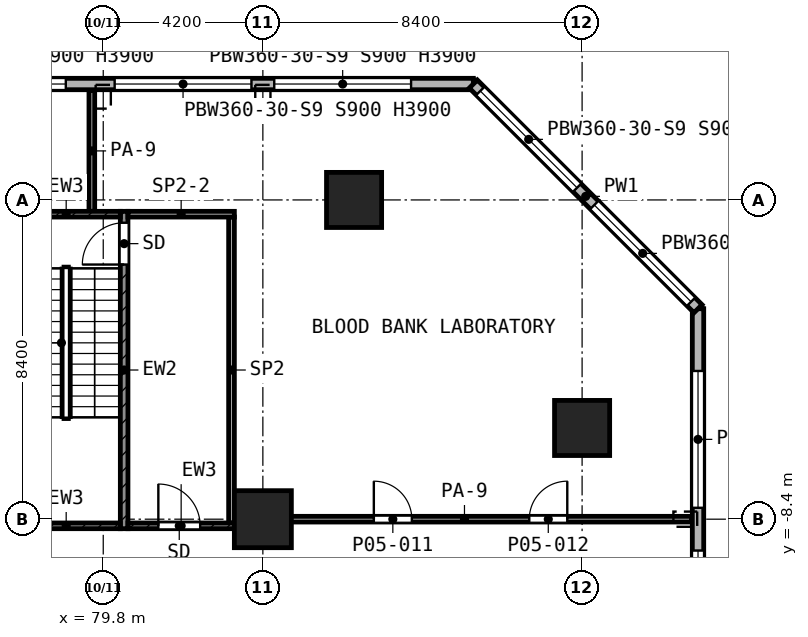
"""IFC4 building model, lengths in metres.
Left out: names, types, materials, properties, quantities, classifications, styles, units other than length and angle.
Written with IfcOpenShell. Run it as: python <this file> out.ifc"""

import sys

from ifc_helpers import new_model, si_unit, direction, frame, frame_2d, origin, origin_2d, place, context, subcontext, project, spatial, rectangle, extrude, element, fill, save


model = new_model("IFC4")
c1 = context("Model", 3, precision=1e-05, world=origin(), true_north=direction((0.0, 1.0)))
c2 = subcontext(c1, "Body", "Model", "MODEL_VIEW")
j1 = project(units=[si_unit("LENGTHUNIT", "METRE"), si_unit("PLANEANGLEUNIT", "RADIAN")], contexts=[c1])
p1 = place(None, origin())
s1 = spatial("IfcSite", under=j1, at=p1, CompositionType="ELEMENT")
p2 = place(p1, origin())
s2 = spatial("IfcBuilding", under=s1, at=p2, CompositionType="ELEMENT")
p3 = place(p2, frame((0.0, 0.0, 23.8)))
s3 = spatial("IfcBuildingStorey", under=s2, at=p3, CompositionType="ELEMENT", Elevation=23.8)
for number, where, z_axis, x_axis in (
    (1, (86.4, 0.0, 0.0), (0.0, 0.0, 1.0), (1.0, 0.0, 0.0)),
    (2, (92.4, -6.0, 0.0), (0.0, 0.0, 1.0), (1.0, 0.0, 0.0)),
):
    element("IfcColumn", number, at=place(p3, frame(where, z_axis=z_axis, x_axis=x_axis)), inside=s3, PredefinedType="COLUMN", context=c2, shape_type="SweptSolid", body=[
        extrude(rectangle(XDim=1.45, YDim=1.45, at=origin_2d()), origin(), (0.0, 0.0, 1.0), 5.2),
    ])
p4 = place(p3, frame((84.0, -8.4, 0.0), z_axis=(0.0, 0.0, 1.0), x_axis=(1.0, 0.0, 0.0)))
e3 = element("IfcColumn", 3, at=p4, inside=s3, PredefinedType="COLUMN", context=c2, shape_type="SweptSolid", body=[
    extrude(rectangle(XDim=1.5, YDim=1.5, at=origin_2d()), origin(), (0.0, 0.0, 1.0), 5.2),
])
p5 = place(p3, frame((95.45, -30.738, 0.0), z_axis=(0.0, 0.0, 1.0), x_axis=(0.0, 1.0, 0.0)))
e4 = element("IfcWall", 4, at=p5, inside=s3, PredefinedType="SOLIDWALL", context=c2, shape_type="SweptSolid", body=[
    extrude(rectangle(XDim=27.876, YDim=0.3, at=frame_2d((13.938, 0.0))), origin(), (0.0, 0.0, 1.0), 4.85),
])
p6 = place(p5, frame((1.638, 0.0, 0.9)))
e5 = element("IfcOpeningElement", 5, at=p6, cuts=e4, PredefinedType="OPENING", context=c2, shape_type="SweptSolid", body=[
    extrude(rectangle(XDim=3.6, YDim=3.0, at=frame_2d((1.8, 1.5))), frame((0.0, 0.16, 0.0), z_axis=(0.0, -1.0, 0.0), x_axis=(1.0, 0.0, 0.0)), (0.0, 0.0, 1.0), 0.32),
])
p7 = place(p5, frame((6.363, 0.0, 0.9)))
e6 = element("IfcOpeningElement", 6, at=p7, cuts=e4, PredefinedType="OPENING", context=c2, shape_type="SweptSolid", body=[
    extrude(rectangle(XDim=1.2, YDim=3.0, at=frame_2d((0.6, 1.5))), frame((0.0, 0.16, 0.0), z_axis=(0.0, -1.0, 0.0), x_axis=(1.0, 0.0, 0.0)), (0.0, 0.0, 1.0), 0.32),
])
p8 = place(p5, frame((10.038, 0.0, 0.9)))
e7 = element("IfcOpeningElement", 7, at=p8, cuts=e4, PredefinedType="OPENING", context=c2, shape_type="SweptSolid", body=[
    extrude(rectangle(XDim=3.6, YDim=3.0, at=frame_2d((1.8, 1.5))), frame((0.0, 0.16, 0.0), z_axis=(0.0, -1.0, 0.0), x_axis=(1.0, 0.0, 0.0)), (0.0, 0.0, 1.0), 0.32),
])
p9 = place(p5, frame((14.238, 0.0, 0.9)))
e8 = element("IfcOpeningElement", 8, at=p9, cuts=e4, PredefinedType="OPENING", context=c2, shape_type="SweptSolid", body=[
    extrude(rectangle(XDim=3.6, YDim=3.0, at=frame_2d((1.8, 1.5))), frame((0.0, 0.16, 0.0), z_axis=(0.0, -1.0, 0.0), x_axis=(1.0, 0.0, 0.0)), (0.0, 0.0, 1.0), 0.32),
])
p10 = place(p5, frame((20.313, 0.0, 0.9)))
e9 = element("IfcOpeningElement", 9, at=p10, cuts=e4, PredefinedType="OPENING", context=c2, shape_type="SweptSolid", body=[
    extrude(rectangle(XDim=1.2, YDim=3.0, at=frame_2d((0.6, 1.5))), frame((0.0, 0.16, 0.0), z_axis=(0.0, -1.0, 0.0), x_axis=(1.0, 0.0, 0.0)), (0.0, 0.0, 1.0), 0.32),
])
p11 = place(p5, frame((22.638, 0.0, 0.9)))
e10 = element("IfcOpeningElement", 10, at=p11, cuts=e4, PredefinedType="OPENING", context=c2, shape_type="SweptSolid", body=[
    extrude(rectangle(XDim=3.6, YDim=3.0, at=frame_2d((1.8, 1.5))), frame((0.0, 0.16, 0.0), z_axis=(0.0, -1.0, 0.0), x_axis=(1.0, 0.0, 0.0)), (0.0, 0.0, 1.0), 0.32),
])
p12 = place(p3, frame((95.45, -2.862, 0.0), z_axis=(0.0, 0.0, 1.0), x_axis=(-0.707106781187, 0.707106781187, 0.0)))
e11 = element("IfcWall", 11, at=p12, inside=s3, PredefinedType="SOLIDWALL", context=c2, shape_type="SweptSolid", body=[
    extrude(rectangle(XDim=8.361, YDim=0.3, at=frame_2d((4.181, 0.0))), origin(), (0.0, 0.0, 1.0), 4.85),
])
p13 = place(p12, frame((0.259, 0.0, 0.9)))
e12 = element("IfcOpeningElement", 12, at=p13, cuts=e11, PredefinedType="OPENING", context=c2, shape_type="SweptSolid", body=[
    extrude(rectangle(XDim=3.6, YDim=3.0, at=frame_2d((1.8, 1.5))), frame((0.0, 0.16, 0.0), z_axis=(0.0, -1.0, 0.0), x_axis=(1.0, 0.0, 0.0)), (0.0, 0.0, 1.0), 0.32),
])
p14 = place(p12, frame((4.502, 0.0, 0.9)))
e13 = element("IfcOpeningElement", 13, at=p14, cuts=e11, PredefinedType="OPENING", context=c2, shape_type="SweptSolid", body=[
    extrude(rectangle(XDim=3.6, YDim=3.0, at=frame_2d((1.8, 1.5))), frame((0.0, 0.16, 0.0), z_axis=(0.0, -1.0, 0.0), x_axis=(1.0, 0.0, 0.0)), (0.0, 0.0, 1.0), 0.32),
])
p15 = place(p3, frame((89.538, 3.05, 0.0), z_axis=(0.0, 0.0, 1.0), x_axis=(-1.0, 0.0, 0.0)))
e14 = element("IfcWall", 14, at=p15, inside=s3, PredefinedType="SOLIDWALL", context=c2, shape_type="SweptSolid", body=[
    extrude(rectangle(XDim=86.676, YDim=0.3, at=frame_2d((43.338, 0.0))), origin(), (0.0, 0.0, 1.0), 4.85),
])
p16 = place(p15, frame((1.638, 0.0, 0.9)))
e15 = element("IfcOpeningElement", 15, at=p16, cuts=e14, PredefinedType="OPENING", context=c2, shape_type="SweptSolid", body=[
    extrude(rectangle(XDim=3.6, YDim=3.0, at=frame_2d((1.8, 1.5))), frame((0.0, 0.16, 0.0), z_axis=(0.0, -1.0, 0.0), x_axis=(1.0, 0.0, 0.0)), (0.0, 0.0, 1.0), 0.32),
])
p17 = place(p15, frame((5.838, 0.0, 0.9)))
e16 = element("IfcOpeningElement", 16, at=p17, cuts=e14, PredefinedType="OPENING", context=c2, shape_type="SweptSolid", body=[
    extrude(rectangle(XDim=3.6, YDim=3.0, at=frame_2d((1.8, 1.5))), frame((0.0, 0.16, 0.0), z_axis=(0.0, -1.0, 0.0), x_axis=(1.0, 0.0, 0.0)), (0.0, 0.0, 1.0), 0.32),
])
p18 = place(p15, frame((10.723, 0.0, 0.9)))
e17 = element("IfcOpeningElement", 17, at=p18, cuts=e14, PredefinedType="OPENING", context=c2, shape_type="SweptSolid", body=[
    extrude(rectangle(XDim=2.4, YDim=3.0, at=frame_2d((1.2, 1.5))), frame((0.0, 0.16, 0.0), z_axis=(0.0, -1.0, 0.0), x_axis=(1.0, 0.0, 0.0)), (0.0, 0.0, 1.0), 0.32),
])
p19 = place(p15, frame((14.623, 0.0, 0.9)))
e18 = element("IfcOpeningElement", 18, at=p19, cuts=e14, PredefinedType="OPENING", context=c2, shape_type="SweptSolid", body=[
    extrude(rectangle(XDim=2.4, YDim=3.0, at=frame_2d((1.2, 1.5))), frame((0.0, 0.16, 0.0), z_axis=(0.0, -1.0, 0.0), x_axis=(1.0, 0.0, 0.0)), (0.0, 0.0, 1.0), 0.32),
])
p20 = place(p15, frame((18.438, 0.0, 0.9)))
e19 = element("IfcOpeningElement", 19, at=p20, cuts=e14, PredefinedType="OPENING", context=c2, shape_type="SweptSolid", body=[
    extrude(rectangle(XDim=3.6, YDim=3.0, at=frame_2d((1.8, 1.5))), frame((0.0, 0.16, 0.0), z_axis=(0.0, -1.0, 0.0), x_axis=(1.0, 0.0, 0.0)), (0.0, 0.0, 1.0), 0.32),
])
p21 = place(p15, frame((22.638, 0.0, 0.9)))
e20 = element("IfcOpeningElement", 20, at=p21, cuts=e14, PredefinedType="OPENING", context=c2, shape_type="SweptSolid", body=[
    extrude(rectangle(XDim=3.6, YDim=3.0, at=frame_2d((1.8, 1.5))), frame((0.0, 0.16, 0.0), z_axis=(0.0, -1.0, 0.0), x_axis=(1.0, 0.0, 0.0)), (0.0, 0.0, 1.0), 0.32),
])
p22 = place(p15, frame((26.838, 0.0, 0.9)))
e21 = element("IfcOpeningElement", 21, at=p22, cuts=e14, PredefinedType="OPENING", context=c2, shape_type="SweptSolid", body=[
    extrude(rectangle(XDim=3.6, YDim=3.0, at=frame_2d((1.8, 1.5))), frame((0.0, 0.16, 0.0), z_axis=(0.0, -1.0, 0.0), x_axis=(1.0, 0.0, 0.0)), (0.0, 0.0, 1.0), 0.32),
])
p23 = place(p15, frame((31.038, 0.0, 0.9)))
e22 = element("IfcOpeningElement", 22, at=p23, cuts=e14, PredefinedType="OPENING", context=c2, shape_type="SweptSolid", body=[
    extrude(rectangle(XDim=3.6, YDim=3.0, at=frame_2d((1.8, 1.5))), frame((0.0, 0.16, 0.0), z_axis=(0.0, -1.0, 0.0), x_axis=(1.0, 0.0, 0.0)), (0.0, 0.0, 1.0), 0.32),
])
p24 = place(p15, frame((35.238, 0.0, 0.9)))
e23 = element("IfcOpeningElement", 23, at=p24, cuts=e14, PredefinedType="OPENING", context=c2, shape_type="SweptSolid", body=[
    extrude(rectangle(XDim=3.6, YDim=3.0, at=frame_2d((1.8, 1.5))), frame((0.0, 0.16, 0.0), z_axis=(0.0, -1.0, 0.0), x_axis=(1.0, 0.0, 0.0)), (0.0, 0.0, 1.0), 0.32),
])
p25 = place(p15, frame((39.438, 0.0, 0.9)))
e24 = element("IfcOpeningElement", 24, at=p25, cuts=e14, PredefinedType="OPENING", context=c2, shape_type="SweptSolid", body=[
    extrude(rectangle(XDim=3.6, YDim=3.0, at=frame_2d((1.8, 1.5))), frame((0.0, 0.16, 0.0), z_axis=(0.0, -1.0, 0.0), x_axis=(1.0, 0.0, 0.0)), (0.0, 0.0, 1.0), 0.32),
])
p26 = place(p15, frame((43.638, 0.0, 0.9)))
e25 = element("IfcOpeningElement", 25, at=p26, cuts=e14, PredefinedType="OPENING", context=c2, shape_type="SweptSolid", body=[
    extrude(rectangle(XDim=3.6, YDim=3.0, at=frame_2d((1.8, 1.5))), frame((0.0, 0.16, 0.0), z_axis=(0.0, -1.0, 0.0), x_axis=(1.0, 0.0, 0.0)), (0.0, 0.0, 1.0), 0.32),
])
p27 = place(p15, frame((49.673, 0.0, 0.9)))
e26 = element("IfcOpeningElement", 26, at=p27, cuts=e14, PredefinedType="OPENING", context=c2, shape_type="SweptSolid", body=[
    extrude(rectangle(XDim=1.2, YDim=3.0, at=frame_2d((0.6, 1.5))), frame((0.0, 0.16, 0.0), z_axis=(0.0, -1.0, 0.0), x_axis=(1.0, 0.0, 0.0)), (0.0, 0.0, 1.0), 0.32),
])
p28 = place(p15, frame((52.038, 0.0, 0.9)))
e27 = element("IfcOpeningElement", 27, at=p28, cuts=e14, PredefinedType="OPENING", context=c2, shape_type="SweptSolid", body=[
    extrude(rectangle(XDim=3.6, YDim=3.0, at=frame_2d((1.8, 1.5))), frame((0.0, 0.16, 0.0), z_axis=(0.0, -1.0, 0.0), x_axis=(1.0, 0.0, 0.0)), (0.0, 0.0, 1.0), 0.32),
])
p29 = place(p15, frame((56.623, 0.0, 0.9)))
e28 = element("IfcOpeningElement", 28, at=p29, cuts=e14, PredefinedType="OPENING", context=c2, shape_type="SweptSolid", body=[
    extrude(rectangle(XDim=2.4, YDim=3.0, at=frame_2d((1.2, 1.5))), frame((0.0, 0.16, 0.0), z_axis=(0.0, -1.0, 0.0), x_axis=(1.0, 0.0, 0.0)), (0.0, 0.0, 1.0), 0.32),
])
p30 = place(p15, frame((60.438, 0.0, 0.9)))
e29 = element("IfcOpeningElement", 29, at=p30, cuts=e14, PredefinedType="OPENING", context=c2, shape_type="SweptSolid", body=[
    extrude(rectangle(XDim=3.6, YDim=3.0, at=frame_2d((1.8, 1.5))), frame((0.0, 0.16, 0.0), z_axis=(0.0, -1.0, 0.0), x_axis=(1.0, 0.0, 0.0)), (0.0, 0.0, 1.0), 0.32),
])
p31 = place(p15, frame((64.638, 0.0, 0.9)))
e30 = element("IfcOpeningElement", 30, at=p31, cuts=e14, PredefinedType="OPENING", context=c2, shape_type="SweptSolid", body=[
    extrude(rectangle(XDim=3.6, YDim=3.0, at=frame_2d((1.8, 1.5))), frame((0.0, 0.16, 0.0), z_axis=(0.0, -1.0, 0.0), x_axis=(1.0, 0.0, 0.0)), (0.0, 0.0, 1.0), 0.32),
])
p32 = place(p15, frame((68.838, 0.0, 0.9)))
e31 = element("IfcOpeningElement", 31, at=p32, cuts=e14, PredefinedType="OPENING", context=c2, shape_type="SweptSolid", body=[
    extrude(rectangle(XDim=3.6, YDim=3.0, at=frame_2d((1.8, 1.5))), frame((0.0, 0.16, 0.0), z_axis=(0.0, -1.0, 0.0), x_axis=(1.0, 0.0, 0.0)), (0.0, 0.0, 1.0), 0.32),
])
p33 = place(p15, frame((73.038, 0.0, 0.9)))
e32 = element("IfcOpeningElement", 32, at=p33, cuts=e14, PredefinedType="OPENING", context=c2, shape_type="SweptSolid", body=[
    extrude(rectangle(XDim=3.6, YDim=3.0, at=frame_2d((1.8, 1.5))), frame((0.0, 0.16, 0.0), z_axis=(0.0, -1.0, 0.0), x_axis=(1.0, 0.0, 0.0)), (0.0, 0.0, 1.0), 0.32),
])
p34 = place(p15, frame((77.238, 0.0, 0.9)))
e33 = element("IfcOpeningElement", 33, at=p34, cuts=e14, PredefinedType="OPENING", context=c2, shape_type="SweptSolid", body=[
    extrude(rectangle(XDim=3.6, YDim=3.0, at=frame_2d((1.8, 1.5))), frame((0.0, 0.16, 0.0), z_axis=(0.0, -1.0, 0.0), x_axis=(1.0, 0.0, 0.0)), (0.0, 0.0, 1.0), 0.32),
])
p35 = place(p15, frame((81.438, 0.0, 0.9)))
e34 = element("IfcOpeningElement", 34, at=p35, cuts=e14, PredefinedType="OPENING", context=c2, shape_type="SweptSolid", body=[
    extrude(rectangle(XDim=3.6, YDim=3.0, at=frame_2d((1.8, 1.5))), frame((0.0, 0.16, 0.0), z_axis=(0.0, -1.0, 0.0), x_axis=(1.0, 0.0, 0.0)), (0.0, 0.0, 1.0), 0.32),
])
p36 = place(p3, frame((80.35, -8.65, 0.0), z_axis=(0.0, 0.0, 1.0), x_axis=(0.0, 1.0, 0.0)))
e35 = element("IfcWall", 35, at=p36, inside=s3, PredefinedType="SHEAR", context=c2, shape_type="SweptSolid", body=[
    extrude(rectangle(XDim=8.35, YDim=0.2, at=frame_2d((4.175, 0.0))), origin(), (0.0, 0.0, 1.0), 4.85),
])
p37 = place(p36, frame((6.95, 0.0, 0.0)))
e36 = element("IfcOpeningElement", 36, at=p37, cuts=e35, PredefinedType="OPENING", context=c2, shape_type="SweptSolid", body=[
    extrude(rectangle(XDim=1.1, YDim=2.1, at=frame_2d((0.55, 1.05))), frame((0.0, 0.11, 0.0), z_axis=(0.0, -1.0, 0.0), x_axis=(1.0, 0.0, 0.0)), (0.0, 0.0, 1.0), 0.22),
])
p38 = place(p3, frame((77.4, -0.375, 0.0), z_axis=(0.0, 0.0, 1.0), x_axis=(1.0, 0.0, 0.0)))
e37 = element("IfcWall", 37, at=p38, inside=s3, PredefinedType="SHEAR", context=c2, shape_type="SweptSolid", body=[
    extrude(rectangle(XDim=2.85, YDim=0.15, at=frame_2d((1.425, 0.0))), origin(), (0.0, 0.0, 1.0), 4.85),
])
p39 = place(p3, frame((80.45, -0.375, 0.0), z_axis=(0.0, 0.0, 1.0), x_axis=(1.0, 0.0, 0.0)))
e38 = element("IfcWall", 38, at=p39, inside=s3, PredefinedType="PARTITIONING", context=c2, shape_type="SweptSolid", body=[
    extrude(rectangle(XDim=2.8, YDim=0.15, at=frame_2d((1.4, 0.0))), origin(), (0.0, 0.0, 1.0), 3.45),
])
p40 = place(p3, frame((77.4, -8.575, 0.0), z_axis=(0.0, 0.0, 1.0), x_axis=(1.0, 0.0, 0.0)))
e39 = element("IfcWall", 39, at=p40, inside=s3, PredefinedType="SHEAR", context=c2, shape_type="SweptSolid", body=[
    extrude(rectangle(XDim=2.85, YDim=0.15, at=frame_2d((1.425, 0.0))), origin(), (0.0, 0.0, 1.0), 4.85),
])
p41 = place(p3, frame((80.45, -8.575, 0.0), z_axis=(0.0, 0.0, 1.0), x_axis=(1.0, 0.0, 0.0)))
e40 = element("IfcWall", 40, at=p41, inside=s3, PredefinedType="SHEAR", context=c2, shape_type="SweptSolid", body=[
    extrude(rectangle(XDim=2.8, YDim=0.15, at=frame_2d((1.4, 0.0))), origin(), (0.0, 0.0, 1.0), 4.85),
])
p42 = place(p41, frame((0.8, 0.0, 0.0)))
e41 = element("IfcOpeningElement", 41, at=p42, cuts=e40, PredefinedType="OPENING", context=c2, shape_type="SweptSolid", body=[
    extrude(rectangle(XDim=1.1, YDim=2.1, at=frame_2d((0.55, 1.05))), frame((0.0, 0.085, 0.0), z_axis=(0.0, -1.0, 0.0), x_axis=(1.0, 0.0, 0.0)), (0.0, 0.0, 1.0), 0.17),
])
p43 = place(p3, frame((83.175, -8.5, 0.0), z_axis=(0.0, 0.0, 1.0), x_axis=(0.0, 1.0, 0.0)))
e42 = element("IfcWall", 42, at=p43, inside=s3, PredefinedType="PARTITIONING", context=c2, shape_type="SweptSolid", body=[
    extrude(rectangle(XDim=8.05, YDim=0.15, at=frame_2d((4.025, 0.0))), origin(), (0.0, 0.0, 1.0), 4.85),
])
p44 = place(p3, frame((83.33, -8.4, 0.0), z_axis=(0.0, 0.0, 1.0), x_axis=(1.0, 0.0, 0.0)))
e43 = element("IfcWall", 43, at=p44, inside=s3, PredefinedType="PARTITIONING", context=c2, shape_type="SweptSolid", body=[
    extrude(rectangle(XDim=11.95, YDim=0.15, at=frame_2d((5.975, 0.0))), origin(), (0.0, 0.0, 1.0), 3.45),
])
p45 = place(p44, frame((3.59, 0.0, 0.0)))
e44 = element("IfcOpeningElement", 44, at=p45, cuts=e43, PredefinedType="OPENING", context=c2, shape_type="SweptSolid", body=[
    extrude(rectangle(XDim=1.0, YDim=2.1, at=frame_2d((0.5, 1.05))), frame((0.0, 0.085, 0.0), z_axis=(0.0, -1.0, 0.0), x_axis=(1.0, 0.0, 0.0)), (0.0, 0.0, 1.0), 0.17),
])
p46 = place(p44, frame((7.68, 0.0, 0.0)))
e45 = element("IfcOpeningElement", 45, at=p46, cuts=e43, PredefinedType="OPENING", context=c2, shape_type="SweptSolid", body=[
    extrude(rectangle(XDim=1.0, YDim=2.1, at=frame_2d((0.5, 1.05))), frame((0.0, 0.085, 0.0), z_axis=(0.0, -1.0, 0.0), x_axis=(1.0, 0.0, 0.0)), (0.0, 0.0, 1.0), 0.17),
])
p47 = place(p3, frame((79.5, -0.3, 0.0), z_axis=(0.0, 0.0, 1.0), x_axis=(0.0, 1.0, 0.0)))
e46 = element("IfcWall", 46, at=p47, inside=s3, PredefinedType="PARTITIONING", context=c2, shape_type="SweptSolid", body=[
    extrude(rectangle(XDim=3.18, YDim=0.15, at=frame_2d((1.59, 0.0))), origin(), (0.0, 0.0, 1.0), 3.45),
])
p48 = place(p10, origin())
e47 = element("IfcWindow", 47, at=p48, inside=s3, PartitioningType="SINGLE_PANEL", PredefinedType="WINDOW", context=c2, shape_type="SweptSolid", body=[
    extrude(rectangle(XDim=1.2, YDim=3.0, at=frame_2d((0.6, 1.5))), frame((0.0, 0.03, 0.0), z_axis=(0.0, -1.0, 0.0), x_axis=(1.0, 0.0, 0.0)), (0.0, 0.0, 1.0), 0.06),
])
fill(e9, e47)
p49 = place(p11, origin())
e48 = element("IfcWindow", 48, at=p49, inside=s3, PartitioningType="SINGLE_PANEL", PredefinedType="WINDOW", context=c2, shape_type="SweptSolid", body=[
    extrude(rectangle(XDim=3.6, YDim=3.0, at=frame_2d((1.8, 1.5))), frame((0.0, 0.03, 0.0), z_axis=(0.0, -1.0, 0.0), x_axis=(1.0, 0.0, 0.0)), (0.0, 0.0, 1.0), 0.06),
])
fill(e10, e48)
p50 = place(p13, origin())
e49 = element("IfcWindow", 49, at=p50, inside=s3, PartitioningType="SINGLE_PANEL", PredefinedType="WINDOW", context=c2, shape_type="SweptSolid", body=[
    extrude(rectangle(XDim=3.6, YDim=3.0, at=frame_2d((1.8, 1.5))), frame((0.0, 0.03, 0.0), z_axis=(0.0, -1.0, 0.0), x_axis=(1.0, 0.0, 0.0)), (0.0, 0.0, 1.0), 0.06),
])
fill(e12, e49)
p51 = place(p14, origin())
e50 = element("IfcWindow", 50, at=p51, inside=s3, PartitioningType="SINGLE_PANEL", PredefinedType="WINDOW", context=c2, shape_type="SweptSolid", body=[
    extrude(rectangle(XDim=3.6, YDim=3.0, at=frame_2d((1.8, 1.5))), frame((0.0, 0.03, 0.0), z_axis=(0.0, -1.0, 0.0), x_axis=(1.0, 0.0, 0.0)), (0.0, 0.0, 1.0), 0.06),
])
fill(e13, e50)
p52 = place(p16, origin())
e51 = element("IfcWindow", 51, at=p52, inside=s3, PartitioningType="SINGLE_PANEL", PredefinedType="WINDOW", context=c2, shape_type="SweptSolid", body=[
    extrude(rectangle(XDim=3.6, YDim=3.0, at=frame_2d((1.8, 1.5))), frame((0.0, 0.03, 0.0), z_axis=(0.0, -1.0, 0.0), x_axis=(1.0, 0.0, 0.0)), (0.0, 0.0, 1.0), 0.06),
])
fill(e15, e51)
p53 = place(p17, origin())
e52 = element("IfcWindow", 52, at=p53, inside=s3, PartitioningType="SINGLE_PANEL", PredefinedType="WINDOW", context=c2, shape_type="SweptSolid", body=[
    extrude(rectangle(XDim=3.6, YDim=3.0, at=frame_2d((1.8, 1.5))), frame((0.0, 0.03, 0.0), z_axis=(0.0, -1.0, 0.0), x_axis=(1.0, 0.0, 0.0)), (0.0, 0.0, 1.0), 0.06),
])
fill(e16, e52)
p54 = place(p18, origin())
e53 = element("IfcWindow", 53, at=p54, inside=s3, PartitioningType="SINGLE_PANEL", PredefinedType="WINDOW", context=c2, shape_type="SweptSolid", body=[
    extrude(rectangle(XDim=2.4, YDim=3.0, at=frame_2d((1.2, 1.5))), frame((0.0, 0.03, 0.0), z_axis=(0.0, -1.0, 0.0), x_axis=(1.0, 0.0, 0.0)), (0.0, 0.0, 1.0), 0.06),
])
fill(e17, e53)
p55 = place(p37, origin())
e54 = element("IfcDoor", 54, at=p55, inside=s3, OperationType="SINGLE_SWING_LEFT", PredefinedType="DOOR", context=c2, shape_type="SweptSolid", body=[
    extrude(rectangle(XDim=1.1, YDim=2.1, at=frame_2d((0.55, 1.05))), frame((0.0, 0.025, 0.0), z_axis=(0.0, -1.0, 0.0), x_axis=(1.0, 0.0, 0.0)), (0.0, 0.0, 1.0), 0.05),
])
fill(e36, e54)
p56 = place(p42, origin())
e55 = element("IfcDoor", 55, at=p56, inside=s3, OperationType="SINGLE_SWING_LEFT", PredefinedType="DOOR", context=c2, shape_type="SweptSolid", body=[
    extrude(rectangle(XDim=1.1, YDim=2.1, at=frame_2d((0.55, 1.05))), frame((0.0, 0.025, 0.0), z_axis=(0.0, -1.0, 0.0), x_axis=(1.0, 0.0, 0.0)), (0.0, 0.0, 1.0), 0.05),
])
fill(e41, e55)
p57 = place(p45, origin())
e56 = element("IfcDoor", 56, at=p57, inside=s3, OperationType="SINGLE_SWING_LEFT", PredefinedType="DOOR", context=c2, shape_type="SweptSolid", body=[
    extrude(rectangle(XDim=1.0, YDim=2.1, at=frame_2d((0.5, 1.05))), frame((0.0, 0.025, 0.0), z_axis=(0.0, -1.0, 0.0), x_axis=(1.0, 0.0, 0.0)), (0.0, 0.0, 1.0), 0.05),
])
fill(e44, e56)
p58 = place(p46, origin())
e57 = element("IfcDoor", 57, at=p58, inside=s3, OperationType="SINGLE_SWING_RIGHT", PredefinedType="DOOR", context=c2, shape_type="SweptSolid", body=[
    extrude(rectangle(XDim=1.0, YDim=2.1, at=frame_2d((0.5, 1.05))), frame((0.0, 0.025, 0.0), z_axis=(0.0, -1.0, 0.0), x_axis=(1.0, 0.0, 0.0)), (0.0, 0.0, 1.0), 0.05),
])
fill(e45, e57)
save(model, sys.argv[1])
